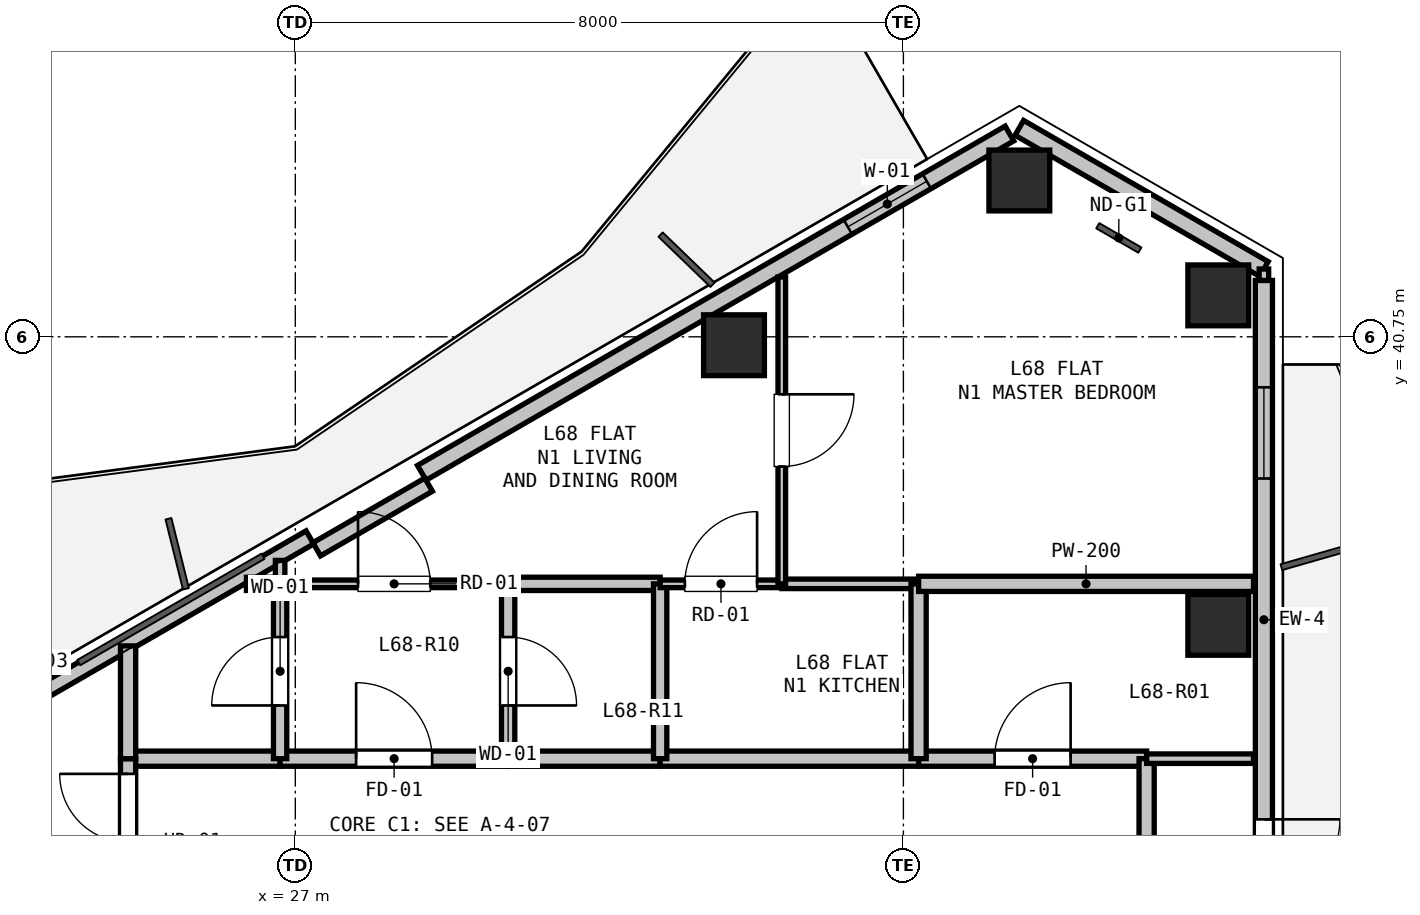
"""IFC4 building model, lengths in metres.
Left out: names, types, materials, properties, quantities, classifications, styles, units other than length and angle.
Written with IfcOpenShell. Run it as: python <this file> out.ifc"""

import sys

from ifc_helpers import new_model, si_unit, direction, frame, frame_2d, origin, origin_2d, place, context, subcontext, project, spatial, rectangle, hollow_rectangle, extrude, element, fill, save


model = new_model("IFC4")
c1 = context("Model", 3, precision=1e-05, world=origin(), true_north=direction((0.0, 1.0)))
c2 = subcontext(c1, "Body", "Model", "MODEL_VIEW")
j1 = project(units=[si_unit("LENGTHUNIT", "METRE"), si_unit("PLANEANGLEUNIT", "RADIAN")], contexts=[c1])
p1 = place(None, origin())
s1 = spatial("IfcSite", under=j1, at=p1, CompositionType="ELEMENT")
p2 = place(p1, origin())
s2 = spatial("IfcBuilding", under=s1, at=p2, CompositionType="ELEMENT")
p3 = place(p2, frame((0.0, 0.0, 243.0)))
s3 = spatial("IfcBuildingStorey", under=s2, at=p3, CompositionType="ELEMENT", Elevation=243.0)
for number, where, z_axis, x_axis in (
    (1, (32.771, 40.639, 0.0), (0.0, 0.0, 1.0), (1.0, 0.0, 0.0)),
    (2, (36.525, 42.807, 0.0), (0.0, 0.0, 1.0), (1.0, 0.0, 0.0)),
    (3, (39.143, 41.295, 0.0), (0.0, 0.0, 1.0), (1.0, 0.0, 0.0)),
    (4, (39.143, 36.961, 0.0), (0.0, 0.0, 1.0), (1.0, 0.0, 0.0)),
):
    element("IfcColumn", number, at=place(p3, frame(where, z_axis=z_axis, x_axis=x_axis)), inside=s3, PredefinedType="COLUMN", context=c2, shape_type="SweptSolid", body=[
        extrude(hollow_rectangle(XDim=0.8, YDim=0.8, WallThickness=0.025, at=origin_2d()), origin(), (0.0, 0.0, 1.0), 3.3),
    ])
p4 = place(p3, frame((36.525, 43.5, 0.0), z_axis=(0.0, 0.0, 1.0), x_axis=(0.866038962515, -0.499976514854, 0.0)))
e5 = element("IfcWall", 5, at=p4, inside=s3, PredefinedType="SOLIDWALL", context=c2, shape_type="SweptSolid", body=[
    extrude(rectangle(XDim=3.716, YDim=0.225, at=frame_2d((1.858, 0.0))), origin(), (0.0, 0.0, 1.0), 2.7),
])
p5 = place(p3, frame((20.066, 33.997, 0.0), z_axis=(0.0, 0.0, 1.0), x_axis=(0.866019557082, 0.500010126649, 0.0)))
e6 = element("IfcWall", 6, at=p5, inside=s3, PredefinedType="PARAPET", context=c2, shape_type="SweptSolid", body=[
    extrude(rectangle(XDim=8.228, YDim=0.2, at=frame_2d((4.114, 0.0))), origin(), (0.0, 0.0, 1.0), 0.2),
])
p6 = place(p3, frame((28.664, 38.96, 0.0), z_axis=(0.0, 0.0, 1.0), x_axis=(0.866026655105, 0.499997832642, 0.0)))
e7 = element("IfcWall", 7, at=p6, inside=s3, PredefinedType="SOLIDWALL", context=c2, shape_type="SweptSolid", body=[
    extrude(rectangle(XDim=8.928, YDim=0.225, at=frame_2d((4.464, 0.0))), origin(), (0.0, 0.0, 1.0), 2.7),
])
p7 = place(p6, frame((6.472, 0.0, 0.9)))
e8 = element("IfcOpeningElement", 8, at=p7, cuts=e7, PredefinedType="OPENING", context=c2, shape_type="SweptSolid", body=[
    extrude(rectangle(XDim=1.2, YDim=1.4, at=frame_2d((0.6, 0.7))), frame((0.0, 0.123, 0.0), z_axis=(0.0, -1.0, 0.0), x_axis=(1.0, 0.0, 0.0)), (0.0, 0.0, 1.0), 0.245),
])
p8 = place(p3, frame((27.281, 37.955, 0.0), z_axis=(0.0, 0.0, 1.0), x_axis=(0.866025371046, 0.500000056704, 0.0)))
e9 = element("IfcWall", 9, at=p8, inside=s3, PredefinedType="PARAPET", context=c2, shape_type="SweptSolid", body=[
    extrude(rectangle(XDim=1.7, YDim=0.2, at=frame_2d((0.85, 0.0))), origin(), (0.0, 0.0, 1.0), 2.7),
])
p9 = place(p3, frame((39.743, 41.492, 0.0), z_axis=(0.0, 0.0, 1.0), x_axis=(0.0, -1.0, 0.0)))
e10 = element("IfcWall", 10, at=p9, inside=s3, PredefinedType="SOLIDWALL", context=c2, shape_type="SweptSolid", body=[
    extrude(rectangle(XDim=8.928, YDim=0.225, at=frame_2d((4.464, 0.0))), origin(), (0.0, 0.0, 1.0), 2.7),
])
p10 = place(p9, frame((7.09, 0.0, 0.0)))
e11 = element("IfcOpeningElement", 11, at=p10, cuts=e10, PredefinedType="OPENING", context=c2, shape_type="SweptSolid", body=[
    extrude(rectangle(XDim=1.0, YDim=2.1, at=frame_2d((0.5, 1.05))), frame((0.0, 0.123, 0.0), z_axis=(0.0, -1.0, 0.0), x_axis=(1.0, 0.0, 0.0)), (0.0, 0.0, 1.0), 0.245),
])
p11 = place(p9, frame((1.406, 0.0, 0.9)))
e12 = element("IfcOpeningElement", 12, at=p11, cuts=e10, PredefinedType="OPENING", context=c2, shape_type="SweptSolid", body=[
    extrude(rectangle(XDim=1.2, YDim=1.4, at=frame_2d((0.6, 0.7))), frame((0.0, 0.123, 0.0), z_axis=(0.0, -1.0, 0.0), x_axis=(1.0, 0.0, 0.0)), (0.0, 0.0, 1.0), 0.245),
])
p12 = place(p3, frame((24.8, 35.2, 0.0), z_axis=(0.0, 0.0, 1.0), x_axis=(1.0, 0.0, 0.0)))
e13 = element("IfcWall", 13, at=p12, inside=s3, PredefinedType="PARTITIONING", context=c2, shape_type="SweptSolid", body=[
    extrude(rectangle(XDim=2.0, YDim=0.2, at=frame_2d((1.0, 0.0))), origin(), (0.0, 0.0, 1.0), 3.08),
])
p13 = place(p3, frame((26.8, 35.2, 0.0), z_axis=(0.0, 0.0, 1.0), x_axis=(1.0, 0.0, 0.0)))
e14 = element("IfcWall", 14, at=p13, inside=s3, PredefinedType="PARTITIONING", context=c2, shape_type="SweptSolid", body=[
    extrude(rectangle(XDim=3.0, YDim=0.2, at=frame_2d((1.5, 0.0))), origin(), (0.0, 0.0, 1.0), 3.08),
])
p14 = place(p13, frame((1.0, 0.0, 0.0)))
e15 = element("IfcOpeningElement", 15, at=p14, cuts=e14, PredefinedType="OPENING", context=c2, shape_type="SweptSolid", body=[
    extrude(rectangle(XDim=1.0, YDim=2.15, at=frame_2d((0.5, 1.075))), frame((0.0, 0.11, 0.0), z_axis=(0.0, -1.0, 0.0), x_axis=(1.0, 0.0, 0.0)), (0.0, 0.0, 1.0), 0.22),
])
p15 = place(p3, frame((29.8, 35.2, 0.0), z_axis=(0.0, 0.0, 1.0), x_axis=(1.0, 0.0, 0.0)))
e16 = element("IfcWall", 16, at=p15, inside=s3, PredefinedType="PARTITIONING", context=c2, shape_type="SweptSolid", body=[
    extrude(rectangle(XDim=2.0, YDim=0.2, at=frame_2d((1.0, 0.0))), origin(), (0.0, 0.0, 1.0), 3.08),
])
p16 = place(p3, frame((31.8, 35.2, 0.0), z_axis=(0.0, 0.0, 1.0), x_axis=(1.0, 0.0, 0.0)))
e17 = element("IfcWall", 17, at=p16, inside=s3, PredefinedType="PARTITIONING", context=c2, shape_type="SweptSolid", body=[
    extrude(rectangle(XDim=3.4, YDim=0.2, at=frame_2d((1.7, 0.0))), origin(), (0.0, 0.0, 1.0), 3.08),
])
p17 = place(p3, frame((35.2, 35.2, 0.0), z_axis=(0.0, 0.0, 1.0), x_axis=(1.0, 0.0, 0.0)))
e18 = element("IfcWall", 18, at=p17, inside=s3, PredefinedType="PARTITIONING", context=c2, shape_type="SweptSolid", body=[
    extrude(rectangle(XDim=3.0, YDim=0.2, at=frame_2d((1.5, 0.0))), origin(), (0.0, 0.0, 1.0), 2.528),
])
p18 = place(p17, frame((1.0, 0.0, 0.0)))
e19 = element("IfcOpeningElement", 19, at=p18, cuts=e18, PredefinedType="OPENING", context=c2, shape_type="SweptSolid", body=[
    extrude(rectangle(XDim=1.0, YDim=2.15, at=frame_2d((0.5, 1.075))), frame((0.0, 0.11, 0.0), z_axis=(0.0, -1.0, 0.0), x_axis=(1.0, 0.0, 0.0)), (0.0, 0.0, 1.0), 0.22),
])
p19 = place(p3, frame((38.2, 35.2, 0.0), z_axis=(0.0, 0.0, 1.0), x_axis=(0.0, -1.0, 0.0)))
e20 = element("IfcWall", 20, at=p19, inside=s3, PredefinedType="PARTITIONING", context=c2, shape_type="SweptSolid", body=[
    extrude(rectangle(XDim=2.45, YDim=0.2, at=frame_2d((1.225, 0.0))), origin(), (0.0, 0.0, 1.0), 3.08),
])
p20 = place(p3, frame((24.8, 33.0, 0.0), z_axis=(0.0, 0.0, 1.0), x_axis=(0.0, 1.0, 0.0)))
e21 = element("IfcWall", 21, at=p20, inside=s3, PredefinedType="PARTITIONING", context=c2, shape_type="SweptSolid", body=[
    extrude(rectangle(XDim=2.2, YDim=0.2, at=frame_2d((1.1, 0.0))), origin(), (0.0, 0.0, 1.0), 2.605),
])
p21 = place(p20, frame((0.2, 0.0, 0.0)))
e22 = element("IfcOpeningElement", 22, at=p21, cuts=e21, PredefinedType="OPENING", context=c2, shape_type="SweptSolid", body=[
    extrude(rectangle(XDim=1.8, YDim=2.2, at=frame_2d((0.9, 1.1))), frame((0.0, 0.11, 0.0), z_axis=(0.0, -1.0, 0.0), x_axis=(1.0, 0.0, 0.0)), (0.0, 0.0, 1.0), 0.22),
])
p22 = place(p3, frame((26.8, 37.5, 0.0), z_axis=(0.0, 0.0, 1.0), x_axis=(1.0, 0.0, 0.0)))
e23 = element("IfcWall", 23, at=p22, inside=s3, PredefinedType="PARTITIONING", context=c2, shape_type="SweptSolid", body=[
    extrude(rectangle(XDim=3.0, YDim=0.1, at=frame_2d((1.5, 0.0))), origin(), (0.0, 0.0, 1.0), 2.365),
])
p23 = place(p22, frame((1.025, 0.0, 0.0)))
e24 = element("IfcOpeningElement", 24, at=p23, cuts=e23, PredefinedType="OPENING", context=c2, shape_type="SweptSolid", body=[
    extrude(rectangle(XDim=0.95, YDim=2.1, at=frame_2d((0.475, 1.05))), frame((0.0, 0.06, 0.0), z_axis=(0.0, -1.0, 0.0), x_axis=(1.0, 0.0, 0.0)), (0.0, 0.0, 1.0), 0.12),
])
p24 = place(p3, frame((29.8, 37.5, 0.0), z_axis=(0.0, 0.0, 1.0), x_axis=(0.0, -1.0, 0.0)))
e25 = element("IfcWall", 25, at=p24, inside=s3, PredefinedType="PLUMBINGWALL", context=c2, shape_type="SweptSolid", body=[
    extrude(rectangle(XDim=2.3, YDim=0.175, at=frame_2d((1.15, 0.0))), origin(), (0.0, 0.0, 1.0), 3.08),
])
p25 = place(p24, frame((0.7, 0.0, 0.0)))
e26 = element("IfcOpeningElement", 26, at=p25, cuts=e25, PredefinedType="OPENING", context=c2, shape_type="SweptSolid", body=[
    extrude(rectangle(XDim=0.9, YDim=2.1, at=frame_2d((0.45, 1.05))), frame((0.0, 0.097, 0.0), z_axis=(0.0, -1.0, 0.0), x_axis=(1.0, 0.0, 0.0)), (0.0, 0.0, 1.0), 0.195),
])
p26 = place(p3, frame((26.8, 35.2, 0.0), z_axis=(0.0, 0.0, 1.0), x_axis=(0.0, 1.0, 0.0)))
e27 = element("IfcWall", 27, at=p26, inside=s3, PredefinedType="PLUMBINGWALL", context=c2, shape_type="SweptSolid", body=[
    extrude(rectangle(XDim=2.3, YDim=0.175, at=frame_2d((1.15, 0.0))), origin(), (0.0, 0.0, 1.0), 2.365),
])
p27 = place(p26, frame((0.7, 0.0, 0.0)))
e28 = element("IfcOpeningElement", 28, at=p27, cuts=e27, PredefinedType="OPENING", context=c2, shape_type="SweptSolid", body=[
    extrude(rectangle(XDim=0.9, YDim=2.1, at=frame_2d((0.45, 1.05))), frame((0.0, 0.097, 0.0), z_axis=(0.0, -1.0, 0.0), x_axis=(1.0, 0.0, 0.0)), (0.0, 0.0, 1.0), 0.195),
])
p28 = place(p3, frame((24.8, 35.2, 0.0), z_axis=(0.0, 0.0, 1.0), x_axis=(0.0, 1.0, 0.0)))
e29 = element("IfcWall", 29, at=p28, inside=s3, PredefinedType="PARTITIONING", context=c2, shape_type="SweptSolid", body=[
    extrude(rectangle(XDim=1.484, YDim=0.2, at=frame_2d((0.742, 0.0))), origin(), (0.0, 0.0, 1.0), 2.365),
])
p29 = place(p3, frame((26.357, 37.5, 0.0), z_axis=(0.0, 0.0, 1.0), x_axis=(1.0, 0.0, 0.0)))
e30 = element("IfcWall", 30, at=p29, inside=s3, PredefinedType="PLUMBINGWALL", context=c2, shape_type="SweptSolid", body=[
    extrude(rectangle(XDim=0.428, YDim=0.175, at=frame_2d((0.214, 0.0))), origin(), (0.0, 0.0, 1.0), 3.08),
])
p30 = place(p3, frame((29.8, 37.5, 0.0), z_axis=(0.0, 0.0, 1.0), x_axis=(1.0, 0.0, 0.0)))
e31 = element("IfcWall", 31, at=p30, inside=s3, PredefinedType="PLUMBINGWALL", context=c2, shape_type="SweptSolid", body=[
    extrude(rectangle(XDim=2.0, YDim=0.175, at=frame_2d((1.0, 0.0))), origin(), (0.0, 0.0, 1.0), 3.08),
])
p31 = place(p3, frame((31.8, 37.5, 0.0), z_axis=(0.0, 0.0, 1.0), x_axis=(0.0, -1.0, 0.0)))
e32 = element("IfcWall", 32, at=p31, inside=s3, PredefinedType="PLUMBINGWALL", context=c2, shape_type="SweptSolid", body=[
    extrude(rectangle(XDim=2.3, YDim=0.175, at=frame_2d((1.15, 0.0))), origin(), (0.0, 0.0, 1.0), 3.08),
])
p32 = place(p3, frame((31.8, 37.5, 0.0), z_axis=(0.0, 0.0, 1.0), x_axis=(1.0, 0.0, 0.0)))
e33 = element("IfcWall", 33, at=p32, inside=s3, PredefinedType="PARTITIONING", context=c2, shape_type="SweptSolid", body=[
    extrude(rectangle(XDim=1.6, YDim=0.1, at=frame_2d((0.8, 0.0))), origin(), (0.0, 0.0, 1.0), 3.08),
])
p33 = place(p32, frame((0.325, 0.0, 0.0)))
e34 = element("IfcOpeningElement", 34, at=p33, cuts=e33, PredefinedType="OPENING", context=c2, shape_type="SweptSolid", body=[
    extrude(rectangle(XDim=0.95, YDim=2.1, at=frame_2d((0.475, 1.05))), frame((0.0, 0.06, 0.0), z_axis=(0.0, -1.0, 0.0), x_axis=(1.0, 0.0, 0.0)), (0.0, 0.0, 1.0), 0.12),
])
p34 = place(p3, frame((33.4, 37.5, 0.0), z_axis=(0.0, 0.0, 1.0), x_axis=(1.0, 0.0, 0.0)))
e35 = element("IfcWall", 35, at=p34, inside=s3, PredefinedType="PARTITIONING", context=c2, shape_type="SweptSolid", body=[
    extrude(rectangle(XDim=1.8, YDim=0.125, at=frame_2d((0.9, 0.0))), origin(), (0.0, 0.0, 1.0), 3.08),
])
p35 = place(p3, frame((35.2, 37.5, 0.0), z_axis=(0.0, 0.0, 1.0), x_axis=(0.0, -1.0, 0.0)))
e36 = element("IfcWall", 36, at=p35, inside=s3, PredefinedType="PARTITIONING", context=c2, shape_type="SweptSolid", body=[
    extrude(rectangle(XDim=2.3, YDim=0.2, at=frame_2d((1.15, 0.0))), origin(), (0.0, 0.0, 1.0), 3.08),
])
p36 = place(p3, frame((39.606, 35.2, 0.0), z_axis=(0.0, 0.0, 1.0), x_axis=(-1.0, 0.0, 0.0)))
e37 = element("IfcWall", 37, at=p36, inside=s3, PredefinedType="PARTITIONING", context=c2, shape_type="SweptSolid", body=[
    extrude(rectangle(XDim=1.406, YDim=0.125, at=frame_2d((0.703, 0.0))), origin(), (0.0, 0.0, 1.0), 2.365),
])
p37 = place(p3, frame((35.2, 37.5, 0.0), z_axis=(0.0, 0.0, 1.0), x_axis=(1.0, 0.0, 0.0)))
e38 = element("IfcWall", 38, at=p37, inside=s3, PredefinedType="PARTITIONING", context=c2, shape_type="SweptSolid", body=[
    extrude(rectangle(XDim=4.406, YDim=0.2, at=frame_2d((2.203, 0.0))), origin(), (0.0, 0.0, 1.0), 2.528),
])
p38 = place(p3, frame((26.8, 37.5, 0.0), z_axis=(0.0, 0.0, 1.0), x_axis=(0.0, 1.0, 0.0)))
e39 = element("IfcWall", 39, at=p38, inside=s3, PredefinedType="PARTITIONING", context=c2, shape_type="SweptSolid", body=[
    extrude(rectangle(XDim=0.308, YDim=0.125, at=frame_2d((0.154, 0.0))), origin(), (0.0, 0.0, 1.0), 3.08),
])
p39 = place(p3, frame((33.4, 41.537, 0.0), z_axis=(0.0, 0.0, 1.0), x_axis=(0.0, -1.0, 0.0)))
e40 = element("IfcWall", 40, at=p39, inside=s3, PredefinedType="PARTITIONING", context=c2, shape_type="SweptSolid", body=[
    extrude(rectangle(XDim=4.037, YDim=0.1, at=frame_2d((2.019, 0.0))), origin(), (0.0, 0.0, 1.0), 2.805),
])
p40 = place(p39, frame((1.544, 0.0, 0.0)))
e41 = element("IfcOpeningElement", 41, at=p40, cuts=e40, PredefinedType="OPENING", context=c2, shape_type="SweptSolid", body=[
    extrude(rectangle(XDim=0.95, YDim=2.1, at=frame_2d((0.475, 1.05))), frame((0.0, 0.06, 0.0), z_axis=(0.0, -1.0, 0.0), x_axis=(1.0, 0.0, 0.0)), (0.0, 0.0, 1.0), 0.12),
])
p41 = place(p3, frame((39.743, 41.642, 0.0), z_axis=(0.0, 0.0, 1.0), x_axis=(0.0, -1.0, 0.0)))
e42 = element("IfcWall", 42, at=p41, inside=s3, PredefinedType="PARTITIONING", context=c2, shape_type="SweptSolid", body=[
    extrude(rectangle(XDim=0.15, YDim=0.125, at=frame_2d((0.075, 0.0))), origin(), (0.0, 0.0, 1.0), 3.08),
])
p42 = place(p7, origin())
e43 = element("IfcWindow", 43, at=p42, inside=s3, PartitioningType="SINGLE_PANEL", PredefinedType="WINDOW", context=c2, shape_type="SweptSolid", body=[
    extrude(rectangle(XDim=1.2, YDim=1.4, at=frame_2d((0.6, 0.7))), frame((0.0, 0.03, 0.0), z_axis=(0.0, -1.0, 0.0), x_axis=(1.0, 0.0, 0.0)), (0.0, 0.0, 1.0), 0.06),
])
fill(e8, e43)
p43 = place(p10, origin())
e44 = element("IfcDoor", 44, at=p43, inside=s3, OperationType="SINGLE_SWING_LEFT", PredefinedType="DOOR", context=c2, shape_type="SweptSolid", body=[
    extrude(rectangle(XDim=1.0, YDim=2.1, at=frame_2d((0.5, 1.05))), frame((0.0, 0.025, 0.0), z_axis=(0.0, -1.0, 0.0), x_axis=(1.0, 0.0, 0.0)), (0.0, 0.0, 1.0), 0.05),
])
fill(e11, e44)
p44 = place(p11, origin())
e45 = element("IfcWindow", 45, at=p44, inside=s3, PartitioningType="SINGLE_PANEL", PredefinedType="WINDOW", context=c2, shape_type="SweptSolid", body=[
    extrude(rectangle(XDim=1.2, YDim=1.4, at=frame_2d((0.6, 0.7))), frame((0.0, 0.03, 0.0), z_axis=(0.0, -1.0, 0.0), x_axis=(1.0, 0.0, 0.0)), (0.0, 0.0, 1.0), 0.06),
])
fill(e12, e45)
p45 = place(p14, origin())
e46 = element("IfcDoor", 46, at=p45, inside=s3, OperationType="SINGLE_SWING_LEFT", PredefinedType="DOOR", context=c2, shape_type="SweptSolid", body=[
    extrude(rectangle(XDim=1.0, YDim=2.15, at=frame_2d((0.5, 1.075))), frame((0.0, 0.025, 0.0), z_axis=(0.0, -1.0, 0.0), x_axis=(1.0, 0.0, 0.0)), (0.0, 0.0, 1.0), 0.05),
])
fill(e15, e46)
p46 = place(p18, origin())
e47 = element("IfcDoor", 47, at=p46, inside=s3, OperationType="SINGLE_SWING_RIGHT", PredefinedType="DOOR", context=c2, shape_type="SweptSolid", body=[
    extrude(rectangle(XDim=1.0, YDim=2.15, at=frame_2d((0.5, 1.075))), frame((0.0, 0.025, 0.0), z_axis=(0.0, -1.0, 0.0), x_axis=(1.0, 0.0, 0.0)), (0.0, 0.0, 1.0), 0.05),
])
fill(e19, e47)
p47 = place(p21, origin())
e48 = element("IfcDoor", 48, at=p47, inside=s3, OperationType="DOUBLE_DOOR_SINGLE_SWING", PredefinedType="DOOR", context=c2, shape_type="SweptSolid", body=[
    extrude(rectangle(XDim=1.8, YDim=2.2, at=frame_2d((0.9, 1.1))), frame((0.0, 0.025, 0.0), z_axis=(0.0, -1.0, 0.0), x_axis=(1.0, 0.0, 0.0)), (0.0, 0.0, 1.0), 0.05),
])
fill(e22, e48)
p48 = place(p27, origin())
e49 = element("IfcDoor", 49, at=p48, inside=s3, OperationType="SINGLE_SWING_LEFT", PredefinedType="DOOR", context=c2, shape_type="SweptSolid", body=[
    extrude(rectangle(XDim=0.9, YDim=2.1, at=frame_2d((0.45, 1.05))), frame((0.0, 0.025, 0.0), z_axis=(0.0, -1.0, 0.0), x_axis=(1.0, 0.0, 0.0)), (0.0, 0.0, 1.0), 0.05),
])
fill(e28, e49)
p49 = place(p25, origin())
e50 = element("IfcDoor", 50, at=p49, inside=s3, OperationType="SINGLE_SWING_RIGHT", PredefinedType="DOOR", context=c2, shape_type="SweptSolid", body=[
    extrude(rectangle(XDim=0.9, YDim=2.1, at=frame_2d((0.45, 1.05))), frame((0.0, 0.025, 0.0), z_axis=(0.0, -1.0, 0.0), x_axis=(1.0, 0.0, 0.0)), (0.0, 0.0, 1.0), 0.05),
])
fill(e26, e50)
p50 = place(p23, origin())
e51 = element("IfcDoor", 51, at=p50, inside=s3, OperationType="SINGLE_SWING_LEFT", PredefinedType="DOOR", context=c2, shape_type="SweptSolid", body=[
    extrude(rectangle(XDim=0.95, YDim=2.1, at=frame_2d((0.475, 1.05))), frame((0.0, 0.025, 0.0), z_axis=(0.0, -1.0, 0.0), x_axis=(1.0, 0.0, 0.0)), (0.0, 0.0, 1.0), 0.05),
])
fill(e24, e51)
p51 = place(p33, origin())
e52 = element("IfcDoor", 52, at=p51, inside=s3, OperationType="SINGLE_SWING_RIGHT", PredefinedType="DOOR", context=c2, shape_type="SweptSolid", body=[
    extrude(rectangle(XDim=0.95, YDim=2.1, at=frame_2d((0.475, 1.05))), frame((0.0, 0.025, 0.0), z_axis=(0.0, -1.0, 0.0), x_axis=(1.0, 0.0, 0.0)), (0.0, 0.0, 1.0), 0.05),
])
fill(e34, e52)
p52 = place(p40, origin())
e53 = element("IfcDoor", 53, at=p52, inside=s3, OperationType="SINGLE_SWING_LEFT", PredefinedType="DOOR", context=c2, shape_type="SweptSolid", body=[
    extrude(rectangle(XDim=0.95, YDim=2.1, at=frame_2d((0.475, 1.05))), frame((0.0, 0.025, 0.0), z_axis=(0.0, -1.0, 0.0), x_axis=(1.0, 0.0, 0.0)), (0.0, 0.0, 1.0), 0.05),
])
fill(e41, e53)
save(model, sys.argv[1])
